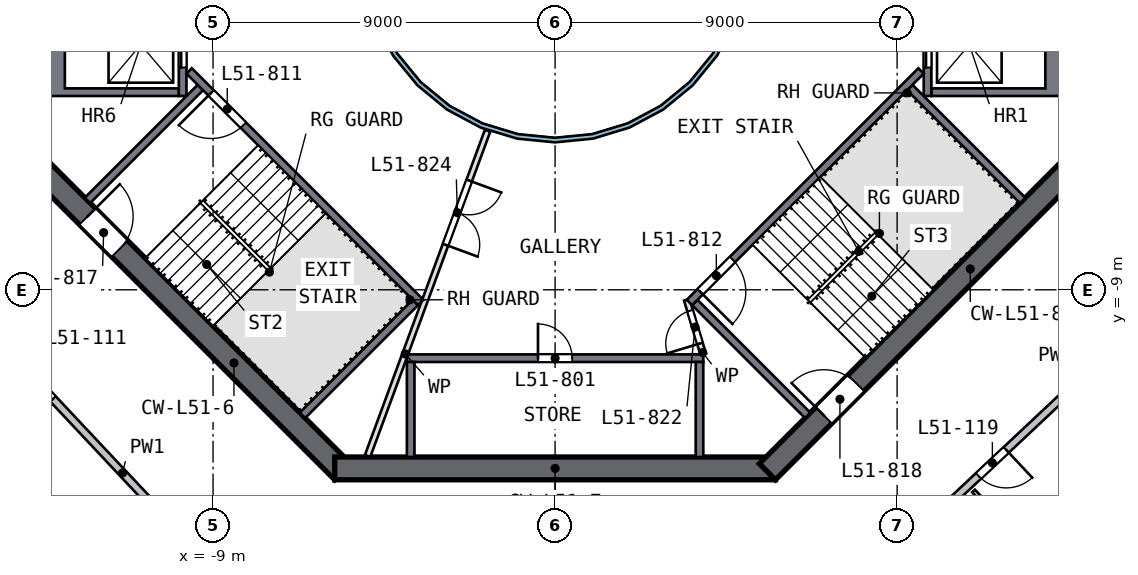
"""IFC4 building model, lengths in metres.
Left out: names, types, materials, properties, quantities, classifications, styles, units other than length and angle.
Written with IfcOpenShell. Run it as: python <this file> out.ifc"""

import sys

from ifc_helpers import new_model, si_unit, direction, frame, frame_2d, origin, place, context, subcontext, project, spatial, polyline, rectangle, outline, extrude, element, fill, save


model = new_model("IFC4")
c1 = context("Model", 3, precision=1e-05, world=origin(), true_north=direction((0.0, 1.0)))
c2 = subcontext(c1, "Body", "Model", "MODEL_VIEW")
j1 = project(units=[si_unit("LENGTHUNIT", "METRE"), si_unit("PLANEANGLEUNIT", "RADIAN")], contexts=[c1])
p1 = place(None, origin())
s1 = spatial("IfcSite", under=j1, at=p1, CompositionType="ELEMENT")
p2 = place(p1, origin())
s2 = spatial("IfcBuilding", under=s1, at=p2, CompositionType="ELEMENT")
p3 = place(p2, frame((0.0, 0.0, 209.0)))
s3 = spatial("IfcBuildingStorey", under=s2, at=p3, CompositionType="ELEMENT", Elevation=209.0)
p4 = place(p3, frame((-13.788, -5.587, 0.0), z_axis=(0.0, 0.0, 1.0), x_axis=(0.707106781, -0.707106781, 0.0)))
e1 = element("IfcWall", 1, at=p4, inside=s3, PredefinedType="SHEAR", context=c2, shape_type="SweptSolid", body=[
    extrude(rectangle(XDim=11.598, YDim=0.6, at=frame_2d((5.799, 0.0))), origin(), (0.0, 0.0, 1.0), 3.5),
])
p5 = place(p4, frame((2.099, 0.0, 0.0)))
e2 = element("IfcOpeningElement", 2, at=p5, cuts=e1, PredefinedType="OPENING", context=c2, shape_type="SweptSolid", body=[
    extrude(rectangle(XDim=1.2, YDim=2.1, at=frame_2d((0.6, 1.05))), frame((0.0, 0.31, 0.0), z_axis=(0.0, -1.0, 0.0), x_axis=(1.0, 0.0, 0.0)), (0.0, 0.0, 1.0), 0.62),
])
p6 = place(p3, frame((-5.799, -13.7, 0.0), z_axis=(0.0, 0.0, 1.0), x_axis=(1.0, 0.0, 0.0)))
e3 = element("IfcWall", 3, at=p6, inside=s3, PredefinedType="SHEAR", context=c2, shape_type="SweptSolid", body=[
    extrude(rectangle(XDim=11.598, YDim=0.6, at=frame_2d((5.799, 0.0))), origin(), (0.0, 0.0, 1.0), 3.5),
])
p7 = place(p3, frame((5.587, -13.788, 0.0), z_axis=(0.0, 0.0, 1.0), x_axis=(0.707106781, 0.707106781, 0.0)))
e4 = element("IfcWall", 4, at=p7, inside=s3, PredefinedType="SHEAR", context=c2, shape_type="SweptSolid", body=[
    extrude(rectangle(XDim=11.598, YDim=0.6, at=frame_2d((5.799, 0.0))), origin(), (0.0, 0.0, 1.0), 3.5),
])
p8 = place(p7, frame((2.099, 0.0, 0.0)))
e5 = element("IfcOpeningElement", 5, at=p8, cuts=e4, PredefinedType="OPENING", context=c2, shape_type="SweptSolid", body=[
    extrude(rectangle(XDim=1.2, YDim=2.1, at=frame_2d((0.6, 1.05))), frame((0.0, 0.31, 0.0), z_axis=(0.0, -1.0, 0.0), x_axis=(1.0, 0.0, 0.0)), (0.0, 0.0, 1.0), 0.62),
])
p9 = place(p3, origin())
e6 = element("IfcWall", 6, at=p9, inside=s3, PredefinedType="SOLIDWALL", context=c2, shape_type="SweptSolid", body=[
    extrude(outline(polyline([(13.4, -3.9), (9.9, -3.9), (9.9, -3.7), (12.9, -3.7), (12.9, -1.4), (9.9, -1.4), (9.9, -1.2), (13.4, -1.2), (13.4, -3.9)])), origin(), (0.0, 0.0, 1.0), 3.19),
])
p10 = place(p3, frame((9.8, -1.2, 0.0), z_axis=(0.0, 0.0, 1.0), x_axis=(0.0, -1.0, 0.0)))
e7 = element("IfcWall", 7, at=p10, inside=s3, PredefinedType="SOLIDWALL", context=c2, shape_type="SweptSolid", body=[
    extrude(rectangle(XDim=2.7, YDim=0.2, at=frame_2d((1.35, 0.0))), origin(), (0.0, 0.0, 1.0), 3.19),
])
p11 = place(p10, frame((0.75, 0.0, 0.0)))
e8 = element("IfcOpeningElement", 8, at=p11, cuts=e7, PredefinedType="OPENING", context=c2, shape_type="SweptSolid", body=[
    extrude(rectangle(XDim=1.2, YDim=2.1, at=frame_2d((0.6, 1.05))), frame((0.0, 0.11, 0.0), z_axis=(0.0, -1.0, 0.0), x_axis=(1.0, 0.0, 0.0)), (0.0, 0.0, 1.0), 0.22),
])
p12 = place(p3, origin())
e9 = element("IfcWall", 9, at=p12, inside=s3, PredefinedType="SOLIDWALL", context=c2, shape_type="SweptSolid", body=[
    extrude(outline(polyline([(-13.4, -3.9), (-13.4, -1.2), (-9.9, -1.2), (-9.9, -1.4), (-12.9, -1.4), (-12.9, -3.7), (-9.9, -3.7), (-9.9, -3.9), (-13.4, -3.9)])), origin(), (0.0, 0.0, 1.0), 3.19),
])
p13 = place(p3, frame((-9.8, -1.2, 0.0), z_axis=(0.0, 0.0, 1.0), x_axis=(0.0, -1.0, 0.0)))
e10 = element("IfcWall", 10, at=p13, inside=s3, PredefinedType="SOLIDWALL", context=c2, shape_type="SweptSolid", body=[
    extrude(rectangle(XDim=2.7, YDim=0.2, at=frame_2d((1.35, 0.0))), origin(), (0.0, 0.0, 1.0), 3.19),
])
p14 = place(p13, frame((0.75, 0.0, 0.0)))
e11 = element("IfcOpeningElement", 11, at=p14, cuts=e10, PredefinedType="OPENING", context=c2, shape_type="SweptSolid", body=[
    extrude(rectangle(XDim=1.2, YDim=2.1, at=frame_2d((0.6, 1.05))), frame((0.0, 0.11, 0.0), z_axis=(0.0, -1.0, 0.0), x_axis=(1.0, 0.0, 0.0)), (0.0, 0.0, 1.0), 0.22),
])
p15 = place(p3, frame((-3.9, -10.8, 0.0), z_axis=(0.0, 0.0, 1.0), x_axis=(1.0, 0.0, 0.0)))
e12 = element("IfcWall", 12, at=p15, inside=s3, PredefinedType="SOLIDWALL", context=c2, shape_type="SweptSolid", body=[
    extrude(rectangle(XDim=7.8, YDim=0.2, at=frame_2d((3.9, 0.0))), origin(), (0.0, 0.0, 1.0), 3.19),
])
p16 = place(p15, frame((3.45, 0.0, 0.0)))
e13 = element("IfcOpeningElement", 13, at=p16, cuts=e12, PredefinedType="OPENING", context=c2, shape_type="SweptSolid", body=[
    extrude(rectangle(XDim=0.9, YDim=2.1, at=frame_2d((0.45, 1.05))), frame((0.0, 0.11, 0.0), z_axis=(0.0, -1.0, 0.0), x_axis=(1.0, 0.0, 0.0)), (0.0, 0.0, 1.0), 0.22),
])
for number, where, z_axis, x_axis in (
    (14, (-3.8, -10.9, 0.0), (0.0, 0.0, 1.0), (0.0, -1.0, 0.0)),
    (15, (3.8, -10.9, 0.0), (0.0, 0.0, 1.0), (0.0, -1.0, 0.0)),
):
    element("IfcWall", number, at=place(p3, frame(where, z_axis=z_axis, x_axis=x_axis)), inside=s3, PredefinedType="SOLIDWALL", context=c2, shape_type="SweptSolid", body=[
        extrude(rectangle(XDim=2.5, YDim=0.2, at=frame_2d((1.25, 0.0))), origin(), (0.0, 0.0, 1.0), 3.19),
    ])
p17 = place(p3, frame((-3.535, -9.334, 0.0), z_axis=(0.0, 0.0, 1.0), x_axis=(-0.707120946, 0.707092617, 0.0)))
e16 = element("IfcWall", 16, at=p17, inside=s3, PredefinedType="SOLIDWALL", context=c2, shape_type="SweptSolid", body=[
    extrude(rectangle(XDim=8.618, YDim=0.2, at=frame_2d((4.309, 0.0))), origin(), (0.0, 0.0, 1.0), 3.19),
])
p18 = place(p17, frame((6.6, 0.0, 0.0)))
e17 = element("IfcOpeningElement", 17, at=p18, cuts=e16, PredefinedType="OPENING", context=c2, shape_type="SweptSolid", body=[
    extrude(rectangle(XDim=1.2, YDim=2.1, at=frame_2d((0.6, 1.05))), frame((0.0, 0.11, 0.0), z_axis=(0.0, -1.0, 0.0), x_axis=(1.0, 0.0, 0.0)), (0.0, 0.0, 1.0), 0.22),
])
for number, where, z_axis, x_axis in (
    (18, (-9.334, -3.677, 0.0), (0.0, 0.0, 1.0), (-0.707, -0.707, 0.0)),
    (19, (-3.677, -9.334, 0.0), (0.0, 0.0, 1.0), (-0.707, -0.707, 0.0)),
):
    element("IfcWall", number, at=place(p3, frame(where, z_axis=z_axis, x_axis=x_axis)), inside=s3, PredefinedType="SOLIDWALL", context=c2, shape_type="SweptSolid", body=[
        extrude(rectangle(XDim=4.2, YDim=0.2, at=frame_2d((2.1, 0.0))), origin(), (0.0, 0.0, 1.0), 3.19),
    ])
p19 = place(p3, frame((9.629, -3.24, 0.0), z_axis=(0.0, 0.0, 1.0), x_axis=(-0.707120946, -0.707092617, 0.0)))
e20 = element("IfcWall", 20, at=p19, inside=s3, PredefinedType="SOLIDWALL", context=c2, shape_type="SweptSolid", body=[
    extrude(rectangle(XDim=8.618, YDim=0.2, at=frame_2d((4.309, 0.0))), origin(), (0.0, 0.0, 1.0), 3.19),
])
p20 = place(p19, frame((7.018, 0.0, 0.0)))
e21 = element("IfcOpeningElement", 21, at=p20, cuts=e20, PredefinedType="OPENING", context=c2, shape_type="SweptSolid", body=[
    extrude(rectangle(XDim=1.2, YDim=2.1, at=frame_2d((0.6, 1.05))), frame((0.0, 0.11, 0.0), z_axis=(0.0, -1.0, 0.0), x_axis=(1.0, 0.0, 0.0)), (0.0, 0.0, 1.0), 0.22),
])
for number, where, z_axis, x_axis in (
    (22, (3.677, -9.334, 0.0), (0.0, 0.0, 1.0), (0.707, -0.707, 0.0)),
    (23, (9.334, -3.677, 0.0), (0.0, 0.0, 1.0), (0.707, -0.707, 0.0)),
):
    element("IfcWall", number, at=place(p3, frame(where, z_axis=z_axis, x_axis=x_axis)), inside=s3, PredefinedType="SOLIDWALL", context=c2, shape_type="SweptSolid", body=[
        extrude(rectangle(XDim=4.2, YDim=0.2, at=frame_2d((2.1, 0.0))), origin(), (0.0, 0.0, 1.0), 3.19),
    ])
p21 = place(p3, frame((3.9, -10.7, 0.0), z_axis=(0.0, 0.0, 1.0), x_axis=(-0.289808785, 0.957084567, 0.0)))
e24 = element("IfcWall", 24, at=p21, inside=s3, PredefinedType="PARTITIONING", context=c2, shape_type="SweptSolid", body=[
    extrude(rectangle(XDim=1.501, YDim=0.15, at=frame_2d((0.75, 0.0))), origin(), (0.0, 0.0, 1.0), 3.19),
])
p22 = place(p21, frame((0.301, 0.0, 0.0)))
e25 = element("IfcOpeningElement", 25, at=p22, cuts=e24, PredefinedType="OPENING", context=c2, shape_type="SweptSolid", body=[
    extrude(rectangle(XDim=0.9, YDim=2.1, at=frame_2d((0.45, 1.05))), frame((0.0, 0.085, 0.0), z_axis=(0.0, -1.0, 0.0), x_axis=(1.0, 0.0, 0.0)), (0.0, 0.0, 1.0), 0.17),
])
p23 = place(p3, frame((-1.776, -4.813, 0.0), z_axis=(0.0, 0.0, 1.0), x_axis=(-0.346112108, -0.938193162, 0.0)))
e26 = element("IfcWall", 26, at=p23, inside=s3, PredefinedType="PARTITIONING", context=c2, shape_type="SweptSolid", body=[
    extrude(rectangle(XDim=9.123, YDim=0.15, at=frame_2d((4.562, 0.0))), origin(), (0.0, 0.0, 1.0), 3.19),
])
p24 = place(p23, frame((1.4, 0.0, 0.0)))
e27 = element("IfcOpeningElement", 27, at=p24, cuts=e26, PredefinedType="OPENING", context=c2, shape_type="SweptSolid", body=[
    extrude(rectangle(XDim=1.8, YDim=2.1, at=frame_2d((0.9, 1.05))), frame((0.0, 0.085, 0.0), z_axis=(0.0, -1.0, 0.0), x_axis=(1.0, 0.0, 0.0)), (0.0, 0.0, 1.0), 0.17),
])
p25 = place(p3, origin())
e28 = element("IfcWall", 28, at=p25, inside=s3, PredefinedType="SOLIDWALL", context=c2, shape_type="SweptSolid", body=[
    extrude(outline(polyline([(5.021, -0.999), (4.73, -1.959), (4.257, -2.844), (3.62, -3.62), (2.844, -4.257), (1.959, -4.73), (0.999, -5.021), (0.0, -5.12), (-0.999, -5.021), (-1.959, -4.73), (-2.844, -4.257), (-3.62, -3.62), (-4.257, -2.844), (-4.73, -1.959), (-5.021, -0.999), (-5.12, 0.0), (-5.021, 0.999), (-4.73, 1.959), (-4.257, 2.844), (-3.62, 3.62), (-2.844, 4.257), (-1.959, 4.73), (-0.999, 5.021), (0.0, 5.12), (0.999, 5.021), (1.959, 4.73), (2.844, 4.257), (3.62, 3.62), (4.257, 2.844), (4.73, 1.959), (5.021, 0.999), (5.12, 0.0), (5.021, -0.999)]), holes=[polyline([(4.904, 0.976), (4.619, 1.913), (4.157, 2.778), (3.535, 3.535), (2.778, 4.157), (1.913, 4.619), (0.976, 4.904), (0.0, 5.0), (-0.976, 4.904), (-1.913, 4.619), (-2.778, 4.157), (-3.535, 3.535), (-4.157, 2.778), (-4.619, 1.913), (-4.904, 0.976), (-5.0, 0.0), (-4.904, -0.976), (-4.619, -1.913), (-4.157, -2.778), (-3.535, -3.535), (-2.778, -4.157), (-1.913, -4.619), (-0.976, -4.904), (0.0, -5.0), (0.976, -4.904), (1.913, -4.619), (2.778, -4.157), (3.535, -3.535), (4.157, -2.778), (4.619, -1.913), (4.904, -0.976), (5.0, 0.0), (4.904, 0.976)])]), origin(), (0.0, 0.0, 1.0), 3.19),
])
p26 = place(p3, frame((-9.688, -15.625, 0.0), z_axis=(0.0, 0.0, 1.0), x_axis=(-0.684549323, 0.728966545, 0.0)))
e29 = element("IfcWall", 29, at=p26, inside=s3, PredefinedType="SOLIDWALL", context=c2, shape_type="SweptSolid", body=[
    extrude(rectangle(XDim=9.317, YDim=0.2, at=frame_2d((4.658, 0.0))), origin(), (0.0, 0.0, 1.0), 3.19),
])
p27 = place(p26, frame((5.15, 0.0, 0.0)))
e30 = element("IfcOpeningElement", 30, at=p27, cuts=e29, PredefinedType="OPENING", context=c2, shape_type="SweptSolid", body=[
    extrude(rectangle(XDim=1.0, YDim=2.1, at=frame_2d((0.5, 1.05))), frame((0.0, 0.11, 0.0), z_axis=(0.0, -1.0, 0.0), x_axis=(1.0, 0.0, 0.0)), (0.0, 0.0, 1.0), 0.22),
])
p28 = place(p3, frame((15.625, -9.688, 0.0), z_axis=(0.0, 0.0, 1.0), x_axis=(-0.728966545, -0.684549323, 0.0)))
e31 = element("IfcWall", 31, at=p28, inside=s3, PredefinedType="SOLIDWALL", context=c2, shape_type="SweptSolid", body=[
    extrude(rectangle(XDim=9.317, YDim=0.2, at=frame_2d((4.658, 0.0))), origin(), (0.0, 0.0, 1.0), 3.19),
])
p29 = place(p28, frame((5.15, 0.0, 0.0)))
e32 = element("IfcOpeningElement", 32, at=p29, cuts=e31, PredefinedType="OPENING", context=c2, shape_type="SweptSolid", body=[
    extrude(rectangle(XDim=1.0, YDim=2.1, at=frame_2d((0.5, 1.05))), frame((0.0, 0.11, 0.0), z_axis=(0.0, -1.0, 0.0), x_axis=(1.0, 0.0, 0.0)), (0.0, 0.0, 1.0), 0.22),
])
p30 = place(p3, frame((13.134, -16.554, 0.0), z_axis=(0.0, 0.0, 1.0), x_axis=(-0.684548673, 0.728967156, 0.0)))
e33 = element("IfcWall", 33, at=p30, inside=s3, PredefinedType="PARTITIONING", context=c2, shape_type="SweptSolid", body=[
    extrude(rectangle(XDim=3.1, YDim=0.1, at=frame_2d((1.55, 0.0))), origin(), (0.0, 0.0, 1.0), 3.19),
])
p31 = place(p30, frame((1.15, 0.0, 0.0)))
e34 = element("IfcOpeningElement", 34, at=p31, cuts=e33, PredefinedType="OPENING", context=c2, shape_type="SweptSolid", body=[
    extrude(rectangle(XDim=0.9, YDim=2.1, at=frame_2d((0.45, 1.05))), frame((0.0, 0.06, 0.0), z_axis=(0.0, -1.0, 0.0), x_axis=(1.0, 0.0, 0.0)), (0.0, 0.0, 1.0), 0.12),
])
p32 = place(p16, origin())
e35 = element("IfcDoor", 35, at=p32, inside=s3, OperationType="SINGLE_SWING_LEFT", PredefinedType="DOOR", context=c2, shape_type="SweptSolid", body=[
    extrude(rectangle(XDim=0.9, YDim=2.1, at=frame_2d((0.45, 1.05))), frame((0.0, 0.025, 0.0), z_axis=(0.0, -1.0, 0.0), x_axis=(1.0, 0.0, 0.0)), (0.0, 0.0, 1.0), 0.05),
])
fill(e13, e35)
p33 = place(p11, origin())
e36 = element("IfcDoor", 36, at=p33, inside=s3, OperationType="DOUBLE_DOOR_SLIDING", PredefinedType="DOOR", context=c2, shape_type="SweptSolid", body=[
    extrude(rectangle(XDim=1.2, YDim=2.1, at=frame_2d((0.6, 1.05))), frame((0.0, 0.025, 0.0), z_axis=(0.0, -1.0, 0.0), x_axis=(1.0, 0.0, 0.0)), (0.0, 0.0, 1.0), 0.05),
])
fill(e8, e36)
p34 = place(p14, origin())
e37 = element("IfcDoor", 37, at=p34, inside=s3, OperationType="DOUBLE_DOOR_SLIDING", PredefinedType="DOOR", context=c2, shape_type="SweptSolid", body=[
    extrude(rectangle(XDim=1.2, YDim=2.1, at=frame_2d((0.6, 1.05))), frame((0.0, 0.025, 0.0), z_axis=(0.0, -1.0, 0.0), x_axis=(1.0, 0.0, 0.0)), (0.0, 0.0, 1.0), 0.05),
])
fill(e11, e37)
p35 = place(p18, origin())
e38 = element("IfcDoor", 38, at=p35, inside=s3, OperationType="SINGLE_SWING_RIGHT", PredefinedType="DOOR", context=c2, shape_type="SweptSolid", body=[
    extrude(rectangle(XDim=1.2, YDim=2.1, at=frame_2d((0.6, 1.05))), frame((0.0, 0.025, 0.0), z_axis=(0.0, -1.0, 0.0), x_axis=(1.0, 0.0, 0.0)), (0.0, 0.0, 1.0), 0.05),
])
fill(e17, e38)
p36 = place(p20, origin())
e39 = element("IfcDoor", 39, at=p36, inside=s3, OperationType="SINGLE_SWING_RIGHT", PredefinedType="DOOR", context=c2, shape_type="SweptSolid", body=[
    extrude(rectangle(XDim=1.2, YDim=2.1, at=frame_2d((0.6, 1.05))), frame((0.0, 0.025, 0.0), z_axis=(0.0, -1.0, 0.0), x_axis=(1.0, 0.0, 0.0)), (0.0, 0.0, 1.0), 0.05),
])
fill(e21, e39)
p37 = place(p5, origin())
e40 = element("IfcDoor", 40, at=p37, inside=s3, OperationType="SINGLE_SWING_LEFT", PredefinedType="DOOR", context=c2, shape_type="SweptSolid", body=[
    extrude(rectangle(XDim=1.2, YDim=2.1, at=frame_2d((0.6, 1.05))), frame((0.0, 0.025, 0.0), z_axis=(0.0, -1.0, 0.0), x_axis=(1.0, 0.0, 0.0)), (0.0, 0.0, 1.0), 0.05),
])
fill(e2, e40)
p38 = place(p8, origin())
e41 = element("IfcDoor", 41, at=p38, inside=s3, OperationType="SINGLE_SWING_LEFT", PredefinedType="DOOR", context=c2, shape_type="SweptSolid", body=[
    extrude(rectangle(XDim=1.2, YDim=2.1, at=frame_2d((0.6, 1.05))), frame((0.0, 0.025, 0.0), z_axis=(0.0, -1.0, 0.0), x_axis=(1.0, 0.0, 0.0)), (0.0, 0.0, 1.0), 0.05),
])
fill(e5, e41)
p39 = place(p22, origin())
e42 = element("IfcDoor", 42, at=p39, inside=s3, OperationType="SINGLE_SWING_LEFT", PredefinedType="DOOR", context=c2, shape_type="SweptSolid", body=[
    extrude(rectangle(XDim=0.9, YDim=2.1, at=frame_2d((0.45, 1.05))), frame((0.0, 0.025, 0.0), z_axis=(0.0, -1.0, 0.0), x_axis=(1.0, 0.0, 0.0)), (0.0, 0.0, 1.0), 0.05),
])
fill(e25, e42)
p40 = place(p24, origin())
e43 = element("IfcDoor", 43, at=p40, inside=s3, OperationType="DOUBLE_DOOR_SINGLE_SWING", PredefinedType="DOOR", context=c2, shape_type="SweptSolid", body=[
    extrude(rectangle(XDim=1.8, YDim=2.1, at=frame_2d((0.9, 1.05))), frame((0.0, 0.025, 0.0), z_axis=(0.0, -1.0, 0.0), x_axis=(1.0, 0.0, 0.0)), (0.0, 0.0, 1.0), 0.05),
])
fill(e27, e43)
p41 = place(p27, origin())
e44 = element("IfcDoor", 44, at=p41, inside=s3, OperationType="SINGLE_SWING_LEFT", PredefinedType="DOOR", context=c2, shape_type="SweptSolid", body=[
    extrude(rectangle(XDim=1.0, YDim=2.1, at=frame_2d((0.5, 1.05))), frame((0.0, 0.025, 0.0), z_axis=(0.0, -1.0, 0.0), x_axis=(1.0, 0.0, 0.0)), (0.0, 0.0, 1.0), 0.05),
])
fill(e30, e44)
p42 = place(p29, origin())
e45 = element("IfcDoor", 45, at=p42, inside=s3, OperationType="SINGLE_SWING_LEFT", PredefinedType="DOOR", context=c2, shape_type="SweptSolid", body=[
    extrude(rectangle(XDim=1.0, YDim=2.1, at=frame_2d((0.5, 1.05))), frame((0.0, 0.025, 0.0), z_axis=(0.0, -1.0, 0.0), x_axis=(1.0, 0.0, 0.0)), (0.0, 0.0, 1.0), 0.05),
])
fill(e32, e45)
save(model, sys.argv[1])
